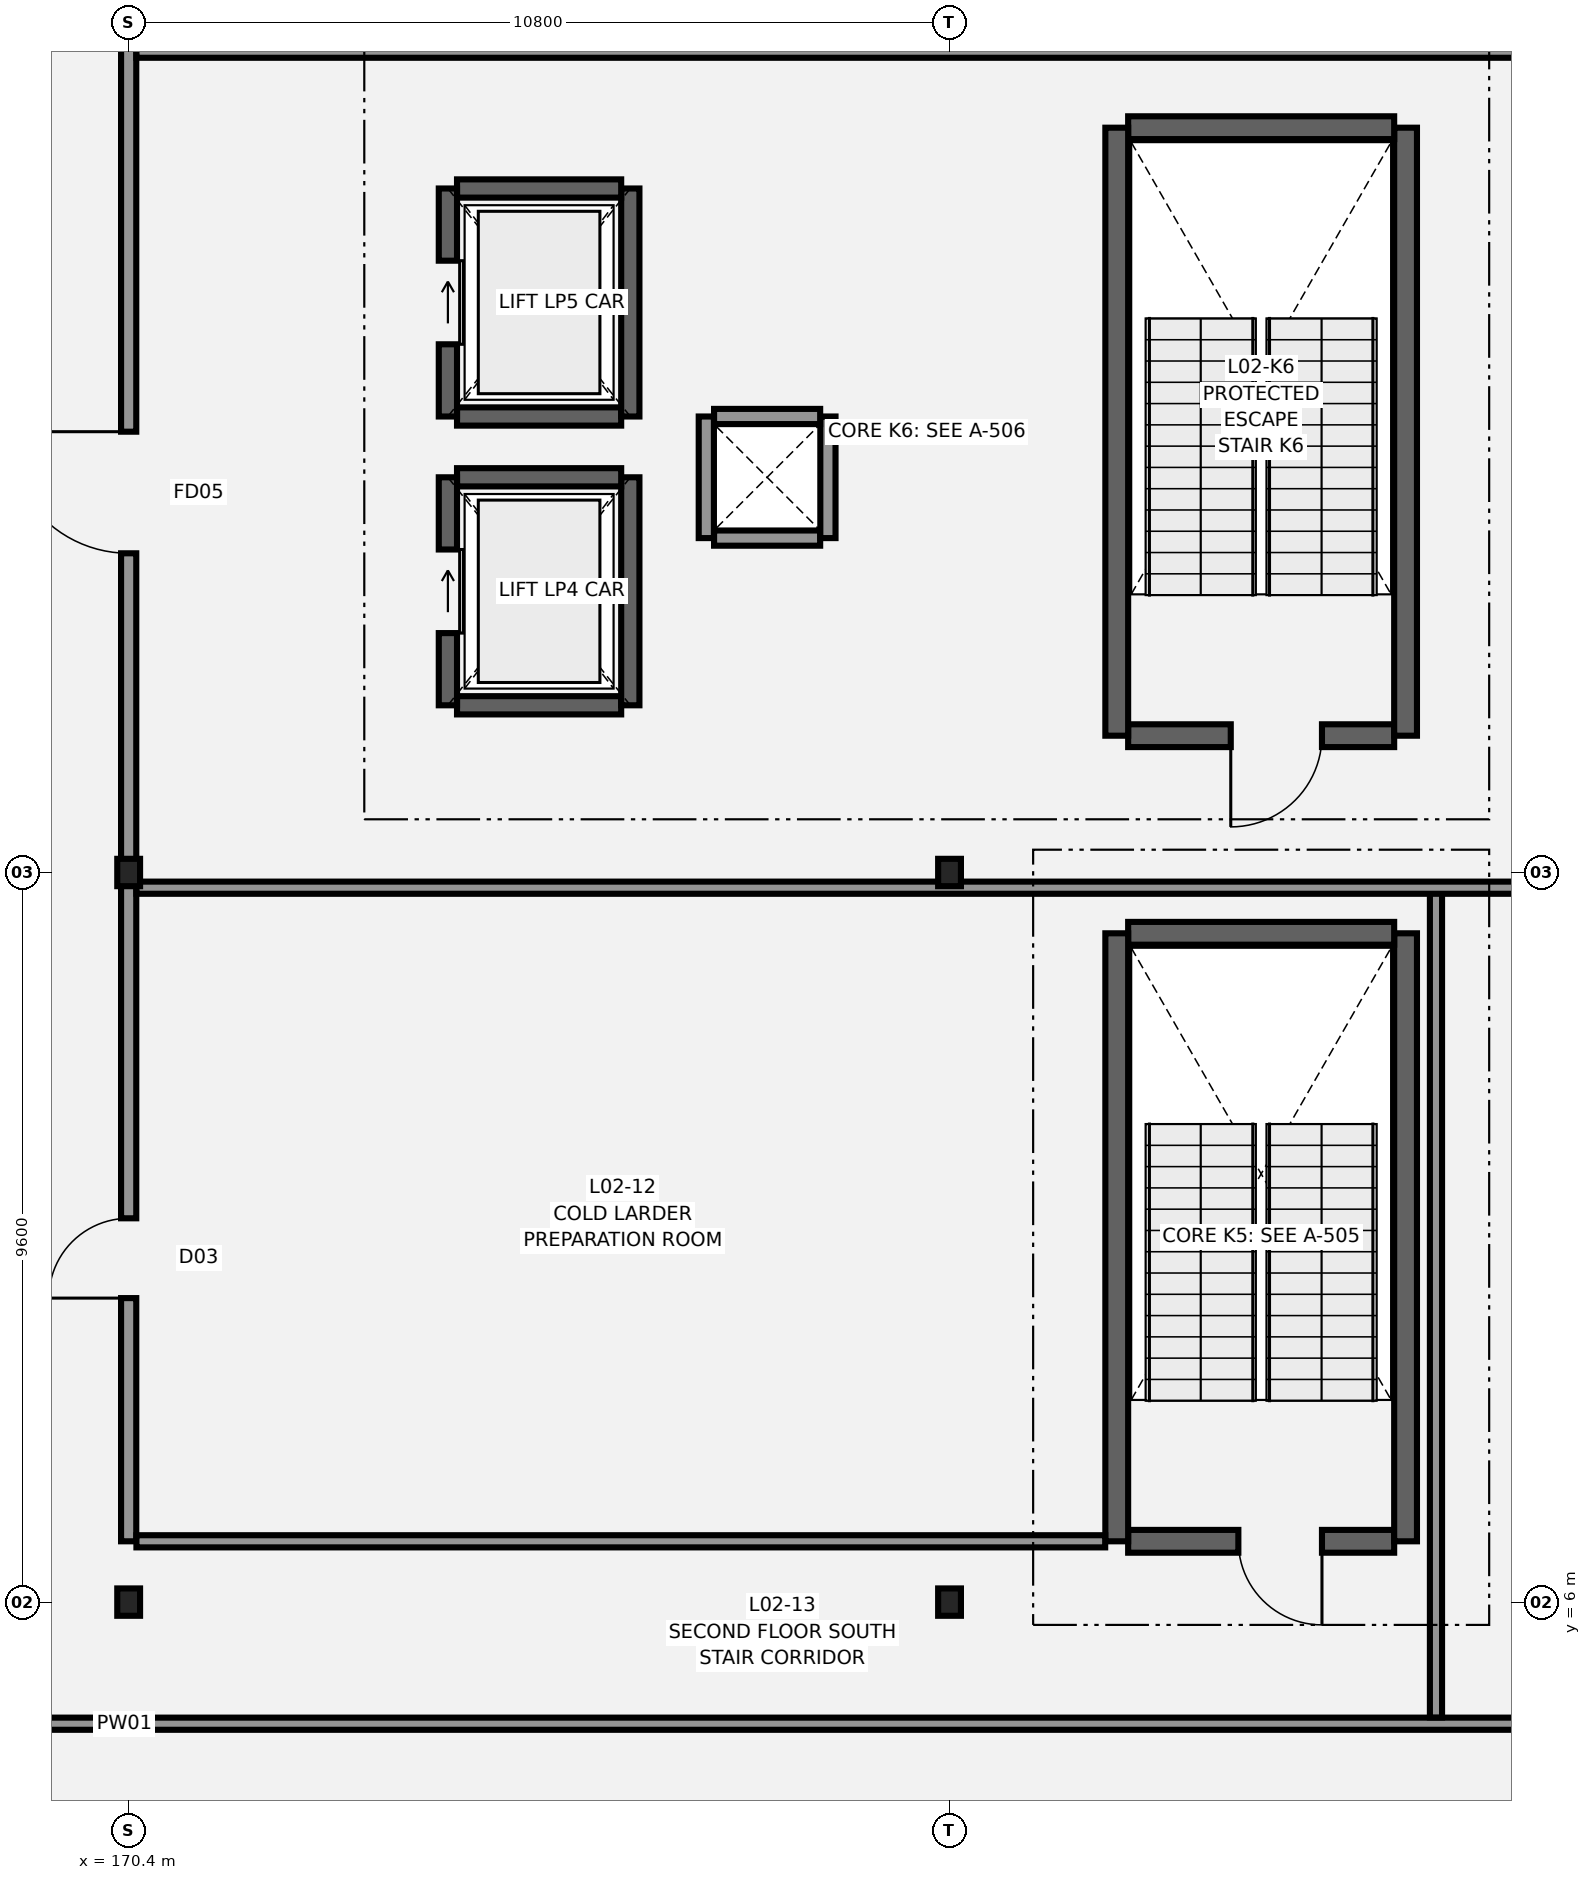
"""IFC4 building model, lengths in metres.
Left out: names, types, materials, properties, quantities, classifications, styles, units other than length and angle.
Written with IfcOpenShell. Run it as: python <this file> out.ifc"""

import sys

from ifc_helpers import new_model, si_unit, direction, frame, frame_2d, origin, origin_2d, place, context, subcontext, project, spatial, rectangle, i_section, extrude, element, fill, save


model = new_model("IFC4")
c1 = context("Model", 3, precision=1e-05, world=origin(), true_north=direction((0.0, 1.0)))
c2 = subcontext(c1, "Body", "Model", "MODEL_VIEW")
j1 = project(units=[si_unit("LENGTHUNIT", "METRE"), si_unit("PLANEANGLEUNIT", "RADIAN")], contexts=[c1])
p1 = place(None, origin())
s1 = spatial("IfcSite", under=j1, at=p1, CompositionType="ELEMENT")
p2 = place(p1, origin())
s2 = spatial("IfcBuilding", under=s1, at=p2, CompositionType="ELEMENT")
p3 = place(p2, frame((0.0, 0.0, 10.2)))
s3 = spatial("IfcBuildingStorey", under=s2, at=p3, CompositionType="ELEMENT", Elevation=10.2)
for number, where, z_axis, x_axis in (
    (1, (170.4, 6.0, 0.0), (0.0, 0.0, 1.0), (1.0, 0.0, 0.0)),
    (2, (170.4, 15.6, 0.0), (0.0, 0.0, 1.0), (1.0, 0.0, 0.0)),
    (3, (181.2, 6.0, 0.0), (0.0, 0.0, 1.0), (1.0, 0.0, 0.0)),
    (4, (181.2, 15.6, 0.0), (0.0, 0.0, 1.0), (1.0, 0.0, 0.0)),
):
    element("IfcColumn", number, at=place(p3, frame(where, z_axis=z_axis, x_axis=x_axis)), inside=s3, PredefinedType="COLUMN", context=c2, shape_type="SweptSolid", body=[
        extrude(i_section(OverallWidth=0.3, OverallDepth=0.36, WebThickness=0.012, FlangeThickness=0.022, FilletRadius=0.027, at=origin_2d()), origin(), (0.0, 0.0, 1.0), 4.2),
    ])
p4 = place(p3, frame((187.05, 6.8, 0.0), z_axis=(0.0, 0.0, 1.0), x_axis=(-1.0, 0.0, 0.0)))
e5 = element("IfcWall", 5, at=p4, inside=s3, PredefinedType="SHEAR", context=c2, shape_type="SweptSolid", body=[
    extrude(rectangle(XDim=3.5, YDim=0.3, at=frame_2d((1.75, 0.0))), origin(), (0.0, 0.0, 1.0), 3.89),
])
p5 = place(p4, frame((0.95, 0.0, 0.0)))
e6 = element("IfcOpeningElement", 6, at=p5, cuts=e5, PredefinedType="OPENING", context=c2, shape_type="SweptSolid", body=[
    extrude(rectangle(XDim=1.1, YDim=2.15, at=frame_2d((0.55, 1.075))), frame((0.0, 0.16, 0.0), z_axis=(0.0, -1.0, 0.0), x_axis=(1.0, 0.0, 0.0)), (0.0, 0.0, 1.0), 0.32),
])
p6 = place(p3, frame((187.2, 6.8, 0.0), z_axis=(0.0, 0.0, 1.0), x_axis=(0.0, 1.0, 0.0)))
e7 = element("IfcWall", 7, at=p6, inside=s3, PredefinedType="SHEAR", context=c2, shape_type="SweptSolid", body=[
    extrude(rectangle(XDim=8.0, YDim=0.3, at=frame_2d((4.0, 0.0))), origin(), (0.0, 0.0, 1.0), 3.89),
])
p7 = place(p3, frame((187.05, 14.8, 0.0), z_axis=(0.0, 0.0, 1.0), x_axis=(-1.0, 0.0, 0.0)))
e8 = element("IfcWall", 8, at=p7, inside=s3, PredefinedType="SHEAR", context=c2, shape_type="SweptSolid", body=[
    extrude(rectangle(XDim=3.5, YDim=0.3, at=frame_2d((1.75, 0.0))), origin(), (0.0, 0.0, 1.0), 3.89),
])
p8 = place(p3, frame((183.4, 14.8, 0.0), z_axis=(0.0, 0.0, 1.0), x_axis=(0.0, -1.0, 0.0)))
e9 = element("IfcWall", 9, at=p8, inside=s3, PredefinedType="SHEAR", context=c2, shape_type="SweptSolid", body=[
    extrude(rectangle(XDim=8.0, YDim=0.3, at=frame_2d((4.0, 0.0))), origin(), (0.0, 0.0, 1.0), 3.89),
])
p9 = place(p3, frame((187.05, 17.4, 0.0), z_axis=(0.0, 0.0, 1.0), x_axis=(-1.0, 0.0, 0.0)))
e10 = element("IfcWall", 10, at=p9, inside=s3, PredefinedType="SHEAR", context=c2, shape_type="SweptSolid", body=[
    extrude(rectangle(XDim=3.5, YDim=0.3, at=frame_2d((1.75, 0.0))), origin(), (0.0, 0.0, 1.0), 3.89),
])
p10 = place(p9, frame((0.95, 0.0, 0.0)))
e11 = element("IfcOpeningElement", 11, at=p10, cuts=e10, PredefinedType="OPENING", context=c2, shape_type="SweptSolid", body=[
    extrude(rectangle(XDim=1.2, YDim=2.2, at=frame_2d((0.6, 1.1))), frame((0.0, 0.16, 0.0), z_axis=(0.0, -1.0, 0.0), x_axis=(1.0, 0.0, 0.0)), (0.0, 0.0, 1.0), 0.32),
])
p11 = place(p3, frame((187.2, 17.4, 0.0), z_axis=(0.0, 0.0, 1.0), x_axis=(0.0, 1.0, 0.0)))
e12 = element("IfcWall", 12, at=p11, inside=s3, PredefinedType="SHEAR", context=c2, shape_type="SweptSolid", body=[
    extrude(rectangle(XDim=8.0, YDim=0.3, at=frame_2d((4.0, 0.0))), origin(), (0.0, 0.0, 1.0), 3.89),
])
p12 = place(p3, frame((187.05, 25.4, 0.0), z_axis=(0.0, 0.0, 1.0), x_axis=(-1.0, 0.0, 0.0)))
e13 = element("IfcWall", 13, at=p12, inside=s3, PredefinedType="SHEAR", context=c2, shape_type="SweptSolid", body=[
    extrude(rectangle(XDim=3.5, YDim=0.3, at=frame_2d((1.75, 0.0))), origin(), (0.0, 0.0, 1.0), 3.89),
])
p13 = place(p3, frame((183.4, 25.4, 0.0), z_axis=(0.0, 0.0, 1.0), x_axis=(0.0, -1.0, 0.0)))
e14 = element("IfcWall", 14, at=p13, inside=s3, PredefinedType="SHEAR", context=c2, shape_type="SweptSolid", body=[
    extrude(rectangle(XDim=8.0, YDim=0.3, at=frame_2d((4.0, 0.0))), origin(), (0.0, 0.0, 1.0), 3.89),
])
p14 = place(p3, frame((174.72, 17.8, 0.0), z_axis=(0.0, 0.0, 1.0), x_axis=(1.0, 0.0, 0.0)))
e15 = element("IfcWall", 15, at=p14, inside=s3, PredefinedType="SHEAR", context=c2, shape_type="SweptSolid", body=[
    extrude(rectangle(XDim=2.16, YDim=0.24, at=frame_2d((1.08, 0.0))), origin(), (0.0, 0.0, 1.0), 3.89),
])
p15 = place(p3, frame((177.0, 17.8, 0.0), z_axis=(0.0, 0.0, 1.0), x_axis=(0.0, 1.0, 0.0)))
e16 = element("IfcWall", 16, at=p15, inside=s3, PredefinedType="SHEAR", context=c2, shape_type="SweptSolid", body=[
    extrude(rectangle(XDim=3.0, YDim=0.24, at=frame_2d((1.5, 0.0))), origin(), (0.0, 0.0, 1.0), 3.89),
])
p16 = place(p3, frame((176.88, 20.8, 0.0), z_axis=(0.0, 0.0, 1.0), x_axis=(-1.0, 0.0, 0.0)))
e17 = element("IfcWall", 17, at=p16, inside=s3, PredefinedType="SHEAR", context=c2, shape_type="SweptSolid", body=[
    extrude(rectangle(XDim=2.16, YDim=0.24, at=frame_2d((1.08, 0.0))), origin(), (0.0, 0.0, 1.0), 3.89),
])
p17 = place(p3, frame((174.6, 20.8, 0.0), z_axis=(0.0, 0.0, 1.0), x_axis=(0.0, -1.0, 0.0)))
e18 = element("IfcWall", 18, at=p17, inside=s3, PredefinedType="SHEAR", context=c2, shape_type="SweptSolid", body=[
    extrude(rectangle(XDim=3.0, YDim=0.24, at=frame_2d((1.5, 0.0))), origin(), (0.0, 0.0, 1.0), 3.89),
])
p18 = place(p17, frame((0.95, 0.0, 0.0)))
e19 = element("IfcOpeningElement", 19, at=p18, cuts=e18, PredefinedType="OPENING", context=c2, shape_type="SweptSolid", body=[
    extrude(rectangle(XDim=1.1, YDim=2.1, at=frame_2d((0.55, 1.05))), frame((0.0, 0.13, 0.0), z_axis=(0.0, -1.0, 0.0), x_axis=(1.0, 0.0, 0.0)), (0.0, 0.0, 1.0), 0.26),
])
p19 = place(p3, frame((174.72, 21.6, 0.0), z_axis=(0.0, 0.0, 1.0), x_axis=(1.0, 0.0, 0.0)))
e20 = element("IfcWall", 20, at=p19, inside=s3, PredefinedType="SHEAR", context=c2, shape_type="SweptSolid", body=[
    extrude(rectangle(XDim=2.16, YDim=0.24, at=frame_2d((1.08, 0.0))), origin(), (0.0, 0.0, 1.0), 3.89),
])
p20 = place(p3, frame((177.0, 21.6, 0.0), z_axis=(0.0, 0.0, 1.0), x_axis=(0.0, 1.0, 0.0)))
e21 = element("IfcWall", 21, at=p20, inside=s3, PredefinedType="SHEAR", context=c2, shape_type="SweptSolid", body=[
    extrude(rectangle(XDim=3.0, YDim=0.24, at=frame_2d((1.5, 0.0))), origin(), (0.0, 0.0, 1.0), 3.89),
])
p21 = place(p3, frame((176.88, 24.6, 0.0), z_axis=(0.0, 0.0, 1.0), x_axis=(-1.0, 0.0, 0.0)))
e22 = element("IfcWall", 22, at=p21, inside=s3, PredefinedType="SHEAR", context=c2, shape_type="SweptSolid", body=[
    extrude(rectangle(XDim=2.16, YDim=0.24, at=frame_2d((1.08, 0.0))), origin(), (0.0, 0.0, 1.0), 3.89),
])
p22 = place(p3, frame((174.6, 24.6, 0.0), z_axis=(0.0, 0.0, 1.0), x_axis=(0.0, -1.0, 0.0)))
e23 = element("IfcWall", 23, at=p22, inside=s3, PredefinedType="SHEAR", context=c2, shape_type="SweptSolid", body=[
    extrude(rectangle(XDim=3.0, YDim=0.24, at=frame_2d((1.5, 0.0))), origin(), (0.0, 0.0, 1.0), 3.89),
])
p23 = place(p22, frame((0.95, 0.0, 0.0)))
e24 = element("IfcOpeningElement", 24, at=p23, cuts=e23, PredefinedType="OPENING", context=c2, shape_type="SweptSolid", body=[
    extrude(rectangle(XDim=1.1, YDim=2.1, at=frame_2d((0.55, 1.05))), frame((0.0, 0.13, 0.0), z_axis=(0.0, -1.0, 0.0), x_axis=(1.0, 0.0, 0.0)), (0.0, 0.0, 1.0), 0.26),
])
p24 = place(p3, frame((148.882, 4.4, 0.0), z_axis=(0.0, 0.0, 1.0), x_axis=(1.0, 0.0, 0.0)))
e25 = element("IfcWall", 25, at=p24, inside=s3, PredefinedType="PARTITIONING", context=c2, shape_type="SweptSolid", body=[
    extrude(rectangle(XDim=42.926, YDim=0.16, at=frame_2d((21.463, 0.0))), origin(), (0.0, 0.0, 1.0), 3.58),
])
p25 = place(p24, frame((19.0, 0.0, 0.0)))
e26 = element("IfcOpeningElement", 26, at=p25, cuts=e25, PredefinedType="OPENING", context=c2, shape_type="SweptSolid", body=[
    extrude(rectangle(XDim=1.15, YDim=2.15, at=frame_2d((0.575, 1.075))), frame((0.0, 0.09, 0.0), z_axis=(0.0, -1.0, 0.0), x_axis=(1.0, 0.0, 0.0)), (0.0, 0.0, 1.0), 0.18),
])
p26 = place(p3, frame((170.4, 6.8, 0.0), z_axis=(0.0, 0.0, 1.0), x_axis=(0.0, 1.0, 0.0)))
e27 = element("IfcWall", 27, at=p26, inside=s3, PredefinedType="PARTITIONING", context=c2, shape_type="SweptSolid", body=[
    extrude(rectangle(XDim=32.5, YDim=0.2, at=frame_2d((16.25, 0.0))), origin(), (0.0, 0.0, 1.0), 3.58),
])
p27 = place(p26, frame((3.2, 0.0, 0.0)))
e28 = element("IfcOpeningElement", 28, at=p27, cuts=e27, PredefinedType="OPENING", context=c2, shape_type="SweptSolid", body=[
    extrude(rectangle(XDim=1.05, YDim=2.15, at=frame_2d((0.525, 1.075))), frame((0.0, 0.11, 0.0), z_axis=(0.0, -1.0, 0.0), x_axis=(1.0, 0.0, 0.0)), (0.0, 0.0, 1.0), 0.22),
])
p28 = place(p26, frame((13.0, 0.0, 0.0)))
e29 = element("IfcOpeningElement", 29, at=p28, cuts=e27, PredefinedType="OPENING", context=c2, shape_type="SweptSolid", body=[
    extrude(rectangle(XDim=1.6, YDim=2.2, at=frame_2d((0.8, 1.1))), frame((0.0, 0.11, 0.0), z_axis=(0.0, -1.0, 0.0), x_axis=(1.0, 0.0, 0.0)), (0.0, 0.0, 1.0), 0.22),
])
p29 = place(p26, frame((22.8, 0.0, 0.0)))
e30 = element("IfcOpeningElement", 30, at=p29, cuts=e27, PredefinedType="OPENING", context=c2, shape_type="SweptSolid", body=[
    extrude(rectangle(XDim=1.15, YDim=2.15, at=frame_2d((0.575, 1.075))), frame((0.0, 0.11, 0.0), z_axis=(0.0, -1.0, 0.0), x_axis=(1.0, 0.0, 0.0)), (0.0, 0.0, 1.0), 0.22),
])
p30 = place(p26, frame((28.533, 0.0, 0.0)))
e31 = element("IfcOpeningElement", 31, at=p30, cuts=e27, PredefinedType="OPENING", context=c2, shape_type="SweptSolid", body=[
    extrude(rectangle(XDim=1.02, YDim=2.12, at=frame_2d((0.51, 1.06))), frame((0.0, 0.11, 0.0), z_axis=(0.0, -1.0, 0.0), x_axis=(1.0, 0.0, 0.0)), (0.0, 0.0, 1.0), 0.22),
])
p31 = place(p3, frame((170.502, 6.8, 0.0), z_axis=(0.0, 0.0, 1.0), x_axis=(1.0, 0.0, 0.0)))
e32 = element("IfcWall", 32, at=p31, inside=s3, PredefinedType="PARTITIONING", context=c2, shape_type="SweptSolid", body=[
    extrude(rectangle(XDim=12.746, YDim=0.16, at=frame_2d((6.373, 0.0))), origin(), (0.0, 0.0, 1.0), 3.58),
])
p32 = place(p3, frame((187.6, 4.482, 0.0), z_axis=(0.0, 0.0, 1.0), x_axis=(0.0, 1.0, 0.0)))
e33 = element("IfcWall", 33, at=p32, inside=s3, PredefinedType="PARTITIONING", context=c2, shape_type="SweptSolid", body=[
    extrude(rectangle(XDim=10.918, YDim=0.16, at=frame_2d((5.459, 0.0))), origin(), (0.0, 0.0, 1.0), 3.58),
])
p33 = place(p3, frame((170.502, 15.4, 0.0), z_axis=(0.0, 0.0, 1.0), x_axis=(1.0, 0.0, 0.0)))
e34 = element("IfcWall", 34, at=p33, inside=s3, PredefinedType="PARTITIONING", context=c2, shape_type="SweptSolid", body=[
    extrude(rectangle(XDim=21.198, YDim=0.16, at=frame_2d((10.599, 0.0))), origin(), (0.0, 0.0, 1.0), 3.445),
])
p34 = place(p3, frame((170.502, 26.4, 0.0), z_axis=(0.0, 0.0, 1.0), x_axis=(1.0, 0.0, 0.0)))
e35 = element("IfcWall", 35, at=p34, inside=s3, PredefinedType="PARTITIONING", context=c2, shape_type="SweptSolid", body=[
    extrude(rectangle(XDim=21.306, YDim=0.16, at=frame_2d((10.653, 0.0))), origin(), (0.0, 0.0, 1.0), 3.58),
])
p35 = place(p3, frame((178.102, 20.0, 0.0), z_axis=(0.0, 0.0, 1.0), x_axis=(1.0, 0.0, 0.0)))
e36 = element("IfcWall", 36, at=p35, inside=s3, PredefinedType="PARTITIONING", context=c2, shape_type="SweptSolid", body=[
    extrude(rectangle(XDim=1.396, YDim=0.2, at=frame_2d((0.698, 0.0))), origin(), (0.0, 0.0, 1.0), 3.58),
])
p36 = place(p3, frame((179.6, 20.0, 0.0), z_axis=(0.0, 0.0, 1.0), x_axis=(0.0, 1.0, 0.0)))
e37 = element("IfcWall", 37, at=p36, inside=s3, PredefinedType="PARTITIONING", context=c2, shape_type="SweptSolid", body=[
    extrude(rectangle(XDim=1.6, YDim=0.2, at=frame_2d((0.8, 0.0))), origin(), (0.0, 0.0, 1.0), 3.58),
])
p37 = place(p3, frame((179.498, 21.6, 0.0), z_axis=(0.0, 0.0, 1.0), x_axis=(-1.0, 0.0, 0.0)))
e38 = element("IfcWall", 38, at=p37, inside=s3, PredefinedType="PARTITIONING", context=c2, shape_type="SweptSolid", body=[
    extrude(rectangle(XDim=1.396, YDim=0.2, at=frame_2d((0.698, 0.0))), origin(), (0.0, 0.0, 1.0), 3.58),
])
p38 = place(p3, frame((178.0, 21.6, 0.0), z_axis=(0.0, 0.0, 1.0), x_axis=(0.0, -1.0, 0.0)))
e39 = element("IfcWall", 39, at=p38, inside=s3, PredefinedType="PARTITIONING", context=c2, shape_type="SweptSolid", body=[
    extrude(rectangle(XDim=1.6, YDim=0.2, at=frame_2d((0.8, 0.0))), origin(), (0.0, 0.0, 1.0), 3.58),
])
p39 = place(p27, origin())
e40 = element("IfcDoor", 40, at=p39, inside=s3, OperationType="SINGLE_SWING_LEFT", PredefinedType="DOOR", context=c2, shape_type="SweptSolid", body=[
    extrude(rectangle(XDim=1.05, YDim=2.15, at=frame_2d((0.525, 1.075))), frame((0.0, 0.025, 0.0), z_axis=(0.0, -1.0, 0.0), x_axis=(1.0, 0.0, 0.0)), (0.0, 0.0, 1.0), 0.05),
])
fill(e28, e40)
p40 = place(p28, origin())
e41 = element("IfcDoor", 41, at=p40, inside=s3, OperationType="SINGLE_SWING_RIGHT", PredefinedType="DOOR", context=c2, shape_type="SweptSolid", body=[
    extrude(rectangle(XDim=1.6, YDim=2.2, at=frame_2d((0.8, 1.1))), frame((0.0, 0.025, 0.0), z_axis=(0.0, -1.0, 0.0), x_axis=(1.0, 0.0, 0.0)), (0.0, 0.0, 1.0), 0.05),
])
fill(e29, e41)
p41 = place(p5, origin())
e42 = element("IfcDoor", 42, at=p41, inside=s3, OperationType="SINGLE_SWING_LEFT", PredefinedType="DOOR", context=c2, shape_type="SweptSolid", body=[
    extrude(rectangle(XDim=1.1, YDim=2.15, at=frame_2d((0.55, 1.075))), frame((0.0, 0.025, 0.0), z_axis=(0.0, -1.0, 0.0), x_axis=(1.0, 0.0, 0.0)), (0.0, 0.0, 1.0), 0.05),
])
fill(e6, e42)
p42 = place(p10, origin())
e43 = element("IfcDoor", 43, at=p42, inside=s3, OperationType="SINGLE_SWING_RIGHT", PredefinedType="DOOR", context=c2, shape_type="SweptSolid", body=[
    extrude(rectangle(XDim=1.2, YDim=2.2, at=frame_2d((0.6, 1.1))), frame((0.0, 0.025, 0.0), z_axis=(0.0, -1.0, 0.0), x_axis=(1.0, 0.0, 0.0)), (0.0, 0.0, 1.0), 0.05),
])
fill(e11, e43)
p43 = place(p18, origin())
e44 = element("IfcDoor", 44, at=p43, inside=s3, OperationType="SLIDING_TO_LEFT", PredefinedType="DOOR", context=c2, shape_type="SweptSolid", body=[
    extrude(rectangle(XDim=1.1, YDim=2.1, at=frame_2d((0.55, 1.05))), frame((0.0, 0.025, 0.0), z_axis=(0.0, -1.0, 0.0), x_axis=(1.0, 0.0, 0.0)), (0.0, 0.0, 1.0), 0.05),
])
fill(e19, e44)
p44 = place(p23, origin())
e45 = element("IfcDoor", 45, at=p44, inside=s3, OperationType="SLIDING_TO_LEFT", PredefinedType="DOOR", context=c2, shape_type="SweptSolid", body=[
    extrude(rectangle(XDim=1.1, YDim=2.1, at=frame_2d((0.55, 1.05))), frame((0.0, 0.025, 0.0), z_axis=(0.0, -1.0, 0.0), x_axis=(1.0, 0.0, 0.0)), (0.0, 0.0, 1.0), 0.05),
])
fill(e24, e45)
save(model, sys.argv[1])
